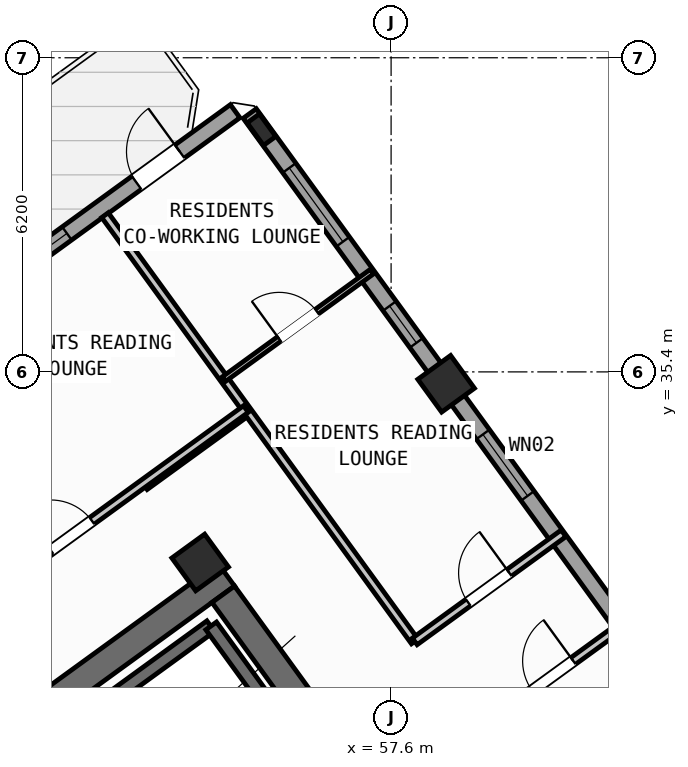
"""IFC4 building model, lengths in metres.
Left out: names, types, materials, properties, quantities, classifications, styles, units other than length and angle.
Written with IfcOpenShell. Run it as: python <this file> out.ifc"""

import sys

from ifc_helpers import new_model, si_unit, direction, frame, frame_2d, origin, origin_2d, place, context, subcontext, project, spatial, rectangle, hollow_rectangle, i_section, extrude, source, transform, mapped, element, fill, save


model = new_model("IFC4")
c1 = context("Model", 3, precision=1e-05, world=origin(), true_north=direction((0.0, 1.0)))
c2 = subcontext(c1, "Body", "Model", "MODEL_VIEW")
j1 = project(units=[si_unit("LENGTHUNIT", "METRE"), si_unit("PLANEANGLEUNIT", "RADIAN")], contexts=[c1])
p1 = place(None, origin())
s1 = spatial("IfcSite", under=j1, at=p1, CompositionType="ELEMENT")
p2 = place(p1, origin())
s2 = spatial("IfcBuilding", under=s1, at=p2, CompositionType="ELEMENT")
p3 = place(p2, frame((0.0, 0.0, 187.8)))
s3 = spatial("IfcBuildingStorey", under=s2, at=p3, CompositionType="ELEMENT", Elevation=187.8)
p4 = place(p3, frame((44.365, 24.142, 0.0), z_axis=(0.0, 0.0, 1.0), x_axis=(0.809024304885, 0.587775190107, 0.0)))
e1 = element("IfcWall", 1, at=p4, inside=s3, PredefinedType="SHEAR", context=c2, shape_type="SweptSolid", body=[
    extrude(rectangle(XDim=12.34, YDim=0.55, at=frame_2d((6.17, 0.0))), origin(), (0.0, 0.0, 1.0), 3.35),
])
p5 = place(p3, frame((58.064, 25.813, 0.0), z_axis=(0.0, 0.0, 1.0), x_axis=(-0.587764933797, 0.809031756236, 0.0)))
e2 = element("IfcWall", 2, at=p5, inside=s3, PredefinedType="SHEAR", context=c2, shape_type="SweptSolid", body=[
    extrude(rectangle(XDim=6.425, YDim=0.55, at=frame_2d((3.212, 0.0))), origin(), (0.0, 0.0, 1.0), 3.35),
])
m1 = source(origin(), c2, "Body", "SweptSolid", [
    extrude(hollow_rectangle(XDim=0.8, YDim=0.8, WallThickness=0.032, at=origin_2d()), origin(), (0.0, 0.0, 1.0), 3.6),
])
for number, where, z_axis, x_axis in (
    (3, (53.832, 31.638, 0.0), (0.0, 0.0, 1.0), (0.809, 0.588, 0.0)),
    (4, (58.686, 35.165, 0.0), (0.0, 0.0, 1.0), (0.809, 0.588, 0.0)),
):
    element("IfcColumn", number, at=place(p3, frame(where, z_axis=z_axis, x_axis=x_axis)), inside=s3, PredefinedType="COLUMN", context=c2, shape_type="MappedRepresentation", body=[
        mapped(m1, transform((0.0, 0.0, 0.0), scale=1.0)),
    ])
m2 = source(origin(), c2, "Body", "SweptSolid", [
    extrude(i_section(OverallWidth=0.3, OverallDepth=0.55, WebThickness=0.015, FlangeThickness=0.029, at=origin_2d()), origin(), (0.0, 0.0, 1.0), 3.6),
])
p6 = place(p3, frame((55.042, 40.181, 0.0), z_axis=(0.0, 0.0, 1.0), x_axis=(0.809016994375, 0.587785252292, 0.0)))
e5 = element("IfcColumn", 5, at=p6, inside=s3, PredefinedType="COLUMN", context=c2, shape_type="MappedRepresentation", body=[
    mapped(m2, transform((0.0, 0.0, 0.0), scale=1.0)),
])
p7 = place(p3, frame((42.207, 31.597, 0.0), z_axis=(0.0, 0.0, 1.0), x_axis=(0.809020333377, 0.587780656523, 0.0)))
e6 = element("IfcWall", 6, at=p7, inside=s3, PredefinedType="STANDARD", context=c2, shape_type="SweptSolid", body=[
    extrude(rectangle(XDim=15.223, YDim=0.32, at=frame_2d((7.611, 0.0))), origin(), (0.0, 0.0, 1.0), 3.35),
])
p8 = place(p7, frame((12.82, 0.0, 0.0)))
e7 = element("IfcOpeningElement", 7, at=p8, cuts=e6, PredefinedType="OPENING", context=c2, shape_type="SweptSolid", body=[
    extrude(rectangle(XDim=1.05, YDim=2.15, at=frame_2d((0.525, 1.075))), frame((0.0, 0.17, 0.0), z_axis=(0.0, -1.0, 0.0), x_axis=(1.0, 0.0, 0.0)), (0.0, 0.0, 1.0), 0.34),
])
p9 = place(p7, frame((0.775, 0.0, 0.85)))
e8 = element("IfcOpeningElement", 8, at=p9, cuts=e6, PredefinedType="OPENING", context=c2, shape_type="SweptSolid", body=[
    extrude(rectangle(XDim=1.8, YDim=1.5, at=frame_2d((0.9, 0.75))), frame((0.0, 0.17, 0.0), z_axis=(0.0, -1.0, 0.0), x_axis=(1.0, 0.0, 0.0)), (0.0, 0.0, 1.0), 0.34),
])
p10 = place(p7, frame((5.544, 0.0, 0.85)))
e9 = element("IfcOpeningElement", 9, at=p10, cuts=e6, PredefinedType="OPENING", context=c2, shape_type="SweptSolid", body=[
    extrude(rectangle(XDim=1.8, YDim=1.5, at=frame_2d((0.9, 0.75))), frame((0.0, 0.17, 0.0), z_axis=(0.0, -1.0, 0.0), x_axis=(1.0, 0.0, 0.0)), (0.0, 0.0, 1.0), 0.34),
])
p11 = place(p7, frame((10.219, 0.0, 1.0)))
e10 = element("IfcOpeningElement", 10, at=p11, cuts=e6, PredefinedType="OPENING", context=c2, shape_type="SweptSolid", body=[
    extrude(rectangle(XDim=0.9, YDim=1.25, at=frame_2d((0.45, 0.625))), frame((0.0, 0.17, 0.0), z_axis=(0.0, -1.0, 0.0), x_axis=(1.0, 0.0, 0.0)), (0.0, 0.0, 1.0), 0.34),
])
p12 = place(p3, frame((54.81, 40.5, 0.0), z_axis=(0.0, 0.0, 1.0), x_axis=(0.587783625747, -0.809018176127, 0.0)))
e11 = element("IfcWall", 11, at=p12, inside=s3, PredefinedType="STANDARD", context=c2, shape_type="SweptSolid", body=[
    extrude(rectangle(XDim=21.587, YDim=0.32, at=frame_2d((10.794, 0.0))), origin(), (0.0, 0.0, 1.0), 2.825),
])
p13 = place(p12, frame((1.328, 0.0, 0.85)))
e12 = element("IfcOpeningElement", 12, at=p13, cuts=e11, PredefinedType="OPENING", context=c2, shape_type="SweptSolid", body=[
    extrude(rectangle(XDim=1.8, YDim=1.5, at=frame_2d((0.9, 0.75))), frame((0.0, 0.17, 0.0), z_axis=(0.0, -1.0, 0.0), x_axis=(1.0, 0.0, 0.0)), (0.0, 0.0, 1.0), 0.34),
])
p14 = place(p12, frame((4.695, 0.0, 1.0)))
e13 = element("IfcOpeningElement", 13, at=p14, cuts=e11, PredefinedType="OPENING", context=c2, shape_type="SweptSolid", body=[
    extrude(rectangle(XDim=0.9, YDim=1.25, at=frame_2d((0.45, 0.625))), frame((0.0, 0.17, 0.0), z_axis=(0.0, -1.0, 0.0), x_axis=(1.0, 0.0, 0.0)), (0.0, 0.0, 1.0), 0.34),
])
p15 = place(p12, frame((7.829, 0.0, 0.85)))
e14 = element("IfcOpeningElement", 14, at=p15, cuts=e11, PredefinedType="OPENING", context=c2, shape_type="SweptSolid", body=[
    extrude(rectangle(XDim=1.5, YDim=1.5, at=frame_2d((0.75, 0.75))), frame((0.0, 0.17, 0.0), z_axis=(0.0, -1.0, 0.0), x_axis=(1.0, 0.0, 0.0)), (0.0, 0.0, 1.0), 0.34),
])
p16 = place(p12, frame((15.542, 0.0, 0.95)))
e15 = element("IfcOpeningElement", 15, at=p16, cuts=e11, PredefinedType="OPENING", context=c2, shape_type="SweptSolid", body=[
    extrude(rectangle(XDim=1.2, YDim=1.4, at=frame_2d((0.6, 0.7))), frame((0.0, 0.17, 0.0), z_axis=(0.0, -1.0, 0.0), x_axis=(1.0, 0.0, 0.0)), (0.0, 0.0, 1.0), 0.34),
])
p17 = place(p12, frame((19.097, 0.0, 1.0)))
e16 = element("IfcOpeningElement", 16, at=p17, cuts=e11, PredefinedType="OPENING", context=c2, shape_type="SweptSolid", body=[
    extrude(rectangle(XDim=0.9, YDim=1.25, at=frame_2d((0.45, 0.625))), frame((0.0, 0.17, 0.0), z_axis=(0.0, -1.0, 0.0), x_axis=(1.0, 0.0, 0.0)), (0.0, 0.0, 1.0), 0.34),
])
p18 = place(p3, frame((48.006, 25.996, 0.0), z_axis=(0.0, 0.0, 1.0), x_axis=(0.80901903764, 0.587782439969, 0.0)))
e17 = element("IfcWall", 17, at=p18, inside=s3, PredefinedType="SHEAR", context=c2, shape_type="SweptSolid", body=[
    extrude(rectangle(XDim=7.46, YDim=0.26, at=frame_2d((3.73, 0.0))), origin(), (0.0, 0.0, 1.0), 3.35),
])
p19 = place(p3, frame((55.906, 27.831, 0.0), z_axis=(0.0, 0.0, 1.0), x_axis=(-0.587804123638, 0.809003283204, 0.0)))
e18 = element("IfcWall", 18, at=p19, inside=s3, PredefinedType="SHEAR", context=c2, shape_type="SweptSolid", body=[
    extrude(rectangle(XDim=3.16, YDim=0.26, at=frame_2d((1.58, 0.0))), origin(), (0.0, 0.0, 1.0), 3.35),
])
p20 = place(p3, frame((52.739, 33.143, 0.0), z_axis=(0.0, 0.0, 1.0), x_axis=(0.809000999347, 0.58780726693, 0.0)))
e19 = element("IfcWall", 19, at=p20, inside=s3, PredefinedType="PARTITIONING", context=c2, shape_type="SweptSolid", body=[
    extrude(rectangle(XDim=2.51, YDim=0.16, at=frame_2d((1.255, 0.0))), origin(), (0.0, 0.0, 1.0), 3.34),
])
p21 = place(p3, frame((58.067, 30.08, 0.0), z_axis=(0.0, 0.0, 1.0), x_axis=(-0.587787785243, 0.809015154073, 0.0)))
e20 = element("IfcWall", 20, at=p21, inside=s3, PredefinedType="PARTITIONING", context=c2, shape_type="SweptSolid", body=[
    extrude(rectangle(XDim=10.4, YDim=0.16, at=frame_2d((5.2, 0.0))), origin(), (0.0, 0.0, 1.0), 3.34),
])
p22 = place(p3, frame((59.331, 28.341, 0.0), z_axis=(0.0, 0.0, 1.0), x_axis=(0.809003564202, 0.587803736896, 0.0)))
e21 = element("IfcWall", 21, at=p22, inside=s3, PredefinedType="PARTITIONING", context=c2, shape_type="SweptSolid", body=[
    extrude(rectangle(XDim=3.63, YDim=0.16, at=frame_2d((1.815, 0.0))), origin(), (0.0, 0.0, 1.0), 3.34),
])
p23 = place(p22, frame((1.305, 0.0, 0.0)))
e22 = element("IfcOpeningElement", 22, at=p23, cuts=e21, PredefinedType="OPENING", context=c2, shape_type="SweptSolid", body=[
    extrude(rectangle(XDim=1.0, YDim=2.1, at=frame_2d((0.5, 1.05))), frame((0.0, 0.09, 0.0), z_axis=(0.0, -1.0, 0.0), x_axis=(1.0, 0.0, 0.0)), (0.0, 0.0, 1.0), 0.18),
])
p24 = place(p3, frame((58.067, 30.08, 0.0), z_axis=(0.0, 0.0, 1.0), x_axis=(0.809012309495, 0.587791700422, 0.0)))
e23 = element("IfcWall", 23, at=p24, inside=s3, PredefinedType="PARTITIONING", context=c2, shape_type="SweptSolid", body=[
    extrude(rectangle(XDim=3.63, YDim=0.16, at=frame_2d((1.815, 0.0))), origin(), (0.0, 0.0, 1.0), 3.34),
])
p25 = place(p24, frame((1.305, 0.0, 0.0)))
e24 = element("IfcOpeningElement", 24, at=p25, cuts=e23, PredefinedType="OPENING", context=c2, shape_type="SweptSolid", body=[
    extrude(rectangle(XDim=1.0, YDim=2.1, at=frame_2d((0.5, 1.05))), frame((0.0, 0.09, 0.0), z_axis=(0.0, -1.0, 0.0), x_axis=(1.0, 0.0, 0.0)), (0.0, 0.0, 1.0), 0.18),
])
p26 = place(p3, frame((54.304, 35.259, 0.0), z_axis=(0.0, 0.0, 1.0), x_axis=(0.809005039917, 0.58780170584, 0.0)))
e25 = element("IfcWall", 25, at=p26, inside=s3, PredefinedType="PARTITIONING", context=c2, shape_type="SweptSolid", body=[
    extrude(rectangle(XDim=3.61, YDim=0.11, at=frame_2d((1.805, 0.0))), origin(), (0.0, 0.0, 1.0), 3.34),
])
p27 = place(p26, frame((1.345, 0.0, 0.0)))
e26 = element("IfcOpeningElement", 26, at=p27, cuts=e25, PredefinedType="OPENING", context=c2, shape_type="SweptSolid", body=[
    extrude(rectangle(XDim=0.92, YDim=2.08, at=frame_2d((0.46, 1.04))), frame((0.0, 0.065, 0.0), z_axis=(0.0, -1.0, 0.0), x_axis=(1.0, 0.0, 0.0)), (0.0, 0.0, 1.0), 0.13),
])
p28 = place(p3, frame((42.866, 26.044, 0.0), z_axis=(0.0, 0.0, 1.0), x_axis=(0.809020254154, 0.587780765566, 0.0)))
e27 = element("IfcWall", 27, at=p28, inside=s3, PredefinedType="PARTITIONING", context=c2, shape_type="SweptSolid", body=[
    extrude(rectangle(XDim=14.67, YDim=0.16, at=frame_2d((7.335, 0.0))), origin(), (0.0, 0.0, 1.0), 3.34),
])
p29 = place(p28, frame((3.215, 0.0, 0.0)))
e28 = element("IfcOpeningElement", 28, at=p29, cuts=e27, PredefinedType="OPENING", context=c2, shape_type="SweptSolid", body=[
    extrude(rectangle(XDim=1.0, YDim=2.1, at=frame_2d((0.5, 1.05))), frame((0.0, 0.09, 0.0), z_axis=(0.0, -1.0, 0.0), x_axis=(1.0, 0.0, 0.0)), (0.0, 0.0, 1.0), 0.18),
])
p30 = place(p28, frame((9.915, 0.0, 0.0)))
e29 = element("IfcOpeningElement", 29, at=p30, cuts=e27, PredefinedType="OPENING", context=c2, shape_type="SweptSolid", body=[
    extrude(rectangle(XDim=1.0, YDim=2.1, at=frame_2d((0.5, 1.05))), frame((0.0, 0.09, 0.0), z_axis=(0.0, -1.0, 0.0), x_axis=(1.0, 0.0, 0.0)), (0.0, 0.0, 1.0), 0.18),
])
m3 = source(origin(), c2, "Body", "SweptSolid", [
    extrude(rectangle(XDim=1.05, YDim=2.15, at=frame_2d((0.525, 1.075))), frame((0.0, 0.025, 0.0), z_axis=(0.0, -1.0, 0.0), x_axis=(1.0, 0.0, 0.0)), (0.0, 0.0, 1.0), 0.05),
])
p31 = place(p8, origin())
e30 = element("IfcDoor", 30, at=p31, inside=s3, OperationType="SINGLE_SWING_RIGHT", PredefinedType="DOOR", context=c2, shape_type="MappedRepresentation", body=[
    mapped(m3, transform((0.0, 0.0, 0.0), scale=1.0)),
])
fill(e7, e30)
m4 = source(origin(), c2, "Body", "SweptSolid", [
    extrude(rectangle(XDim=0.9, YDim=1.25, at=frame_2d((0.45, 0.625))), frame((0.0, 0.03, 0.0), z_axis=(0.0, -1.0, 0.0), x_axis=(1.0, 0.0, 0.0)), (0.0, 0.0, 1.0), 0.06),
])
p32 = place(p11, origin())
e31 = element("IfcWindow", 31, at=p32, inside=s3, PartitioningType="SINGLE_PANEL", PredefinedType="WINDOW", context=c2, shape_type="MappedRepresentation", body=[
    mapped(m4, transform((0.0, 0.0, 0.0), scale=1.0)),
])
fill(e10, e31)
m5 = source(origin(), c2, "Body", "SweptSolid", [
    extrude(rectangle(XDim=1.8, YDim=1.5, at=frame_2d((0.9, 0.75))), frame((0.0, 0.03, 0.0), z_axis=(0.0, -1.0, 0.0), x_axis=(1.0, 0.0, 0.0)), (0.0, 0.0, 1.0), 0.06),
])
p33 = place(p13, origin())
e32 = element("IfcWindow", 32, at=p33, inside=s3, PartitioningType="SINGLE_PANEL", PredefinedType="WINDOW", context=c2, shape_type="MappedRepresentation", body=[
    mapped(m5, transform((0.0, 0.0, 0.0), scale=1.0)),
])
fill(e12, e32)
p34 = place(p14, origin())
e33 = element("IfcWindow", 33, at=p34, inside=s3, PartitioningType="SINGLE_PANEL", PredefinedType="WINDOW", context=c2, shape_type="MappedRepresentation", body=[
    mapped(m4, transform((0.0, 0.0, 0.0), scale=1.0)),
])
fill(e13, e33)
m6 = source(origin(), c2, "Body", "SweptSolid", [
    extrude(rectangle(XDim=1.5, YDim=1.5, at=frame_2d((0.75, 0.75))), frame((0.0, 0.03, 0.0), z_axis=(0.0, -1.0, 0.0), x_axis=(1.0, 0.0, 0.0)), (0.0, 0.0, 1.0), 0.06),
])
p35 = place(p15, origin())
e34 = element("IfcWindow", 34, at=p35, inside=s3, PartitioningType="SINGLE_PANEL", PredefinedType="WINDOW", context=c2, shape_type="MappedRepresentation", body=[
    mapped(m6, transform((0.0, 0.0, 0.0), scale=1.0)),
])
fill(e14, e34)
m7 = source(origin(), c2, "Body", "SweptSolid", [
    extrude(rectangle(XDim=1.0, YDim=2.1, at=frame_2d((0.5, 1.05))), frame((0.0, 0.025, 0.0), z_axis=(0.0, -1.0, 0.0), x_axis=(1.0, 0.0, 0.0)), (0.0, 0.0, 1.0), 0.05),
])
p36 = place(p25, origin())
e35 = element("IfcDoor", 35, at=p36, inside=s3, OperationType="SINGLE_SWING_RIGHT", PredefinedType="DOOR", context=c2, shape_type="MappedRepresentation", body=[
    mapped(m7, transform((0.0, 0.0, 0.0), scale=1.0)),
])
fill(e24, e35)
m8 = source(origin(), c2, "Body", "SweptSolid", [
    extrude(rectangle(XDim=0.92, YDim=2.08, at=frame_2d((0.46, 1.04))), frame((0.0, 0.025, 0.0), z_axis=(0.0, -1.0, 0.0), x_axis=(1.0, 0.0, 0.0)), (0.0, 0.0, 1.0), 0.05),
])
p37 = place(p27, origin())
e36 = element("IfcDoor", 36, at=p37, inside=s3, OperationType="SINGLE_SWING_LEFT", PredefinedType="DOOR", context=c2, shape_type="MappedRepresentation", body=[
    mapped(m8, transform((0.0, 0.0, 0.0), scale=1.0)),
])
fill(e26, e36)
p38 = place(p23, origin())
e37 = element("IfcDoor", 37, at=p38, inside=s3, OperationType="SINGLE_SWING_RIGHT", PredefinedType="DOOR", context=c2, shape_type="MappedRepresentation", body=[
    mapped(m7, transform((0.0, 0.0, 0.0), scale=1.0)),
])
fill(e22, e37)
p39 = place(p30, origin())
e38 = element("IfcDoor", 38, at=p39, inside=s3, OperationType="SINGLE_SWING_LEFT", PredefinedType="DOOR", context=c2, shape_type="MappedRepresentation", body=[
    mapped(m7, transform((0.0, 0.0, 0.0), scale=1.0)),
])
fill(e29, e38)
save(model, sys.argv[1])
